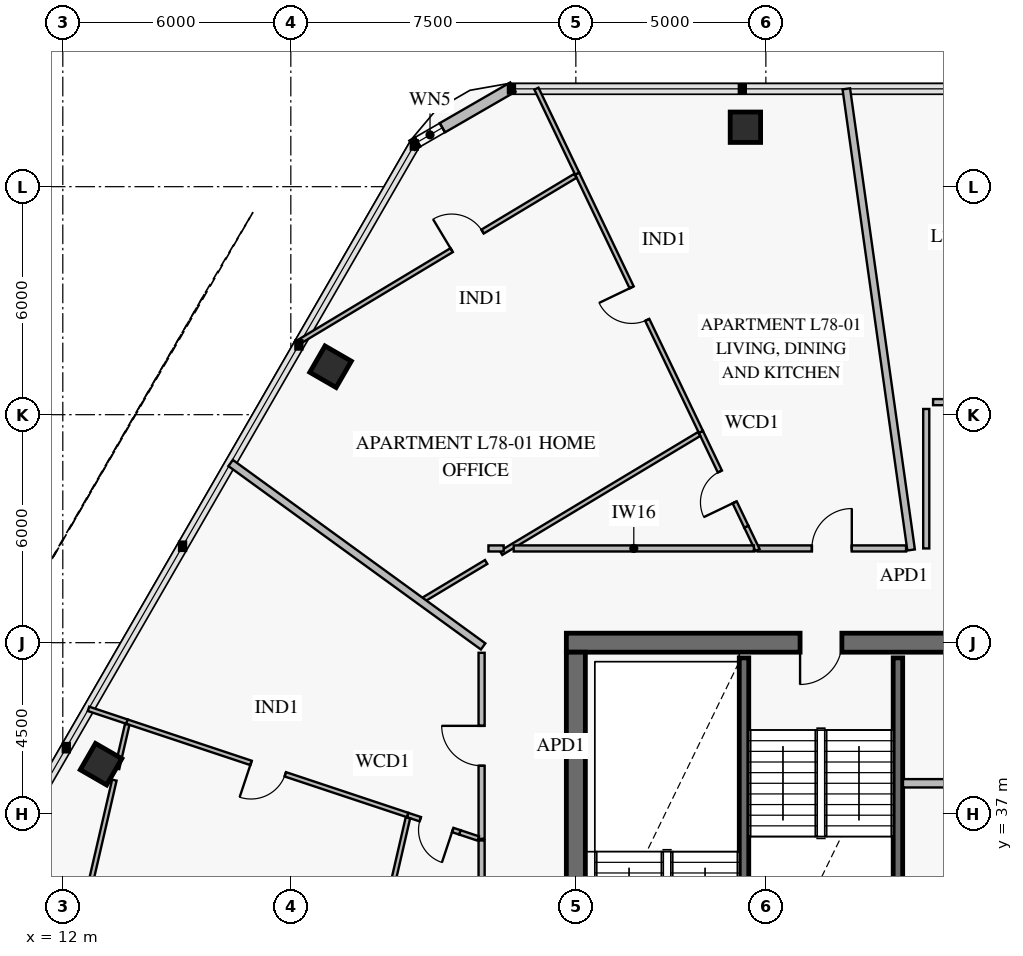
"""IFC4 building model, lengths in metres.
Left out: names, types, materials, properties, quantities, classifications, styles, units other than length and angle.
Written with IfcOpenShell. Run it as: python <this file> out.ifc"""

import sys

from ifc_helpers import new_model, si_unit, direction, frame, frame_2d, origin, origin_2d, place, context, subcontext, project, spatial, rectangle, extrude, element, fill, save


model = new_model("IFC4")
c1 = context("Model", 3, precision=1e-05, world=origin(), true_north=direction((0.0, 1.0)))
c2 = subcontext(c1, "Body", "Model", "MODEL_VIEW")
j1 = project(units=[si_unit("LENGTHUNIT", "METRE"), si_unit("PLANEANGLEUNIT", "RADIAN")], contexts=[c1])
p1 = place(None, origin())
s1 = spatial("IfcSite", under=j1, at=p1, CompositionType="ELEMENT")
p2 = place(p1, origin())
s2 = spatial("IfcBuilding", under=s1, at=p2, CompositionType="ELEMENT")
p3 = place(p2, frame((0.0, 0.0, 308.2)))
s3 = spatial("IfcBuildingStorey", under=s2, at=p3, CompositionType="ELEMENT", Elevation=308.2)
p4 = place(p3, frame((36.75, 41.5, 0.0), z_axis=(0.0, 0.0, 1.0), x_axis=(-1.0, 0.0, 0.0)))
e1 = element("IfcWall", 1, at=p4, inside=s3, PredefinedType="SHEAR", context=c2, shape_type="SweptSolid", body=[
    extrude(rectangle(XDim=11.5, YDim=0.5, at=frame_2d((5.75, 0.0))), origin(), (0.0, 0.0, 1.0), 3.8),
])
p5 = place(p4, frame((4.25, 0.0, 0.0)))
e2 = element("IfcOpeningElement", 2, at=p5, cuts=e1, PredefinedType="OPENING", context=c2, shape_type="SweptSolid", body=[
    extrude(rectangle(XDim=1.1, YDim=2.15, at=frame_2d((0.55, 1.075))), frame((0.0, 0.262, 0.0), z_axis=(0.0, -1.0, 0.0), x_axis=(1.0, 0.0, 0.0)), (0.0, 0.0, 1.0), 0.524),
])
p6 = place(p3, frame((25.5, 22.75, 0.0), z_axis=(0.0, 0.0, 1.0), x_axis=(0.0, 1.0, 0.0)))
e3 = element("IfcWall", 3, at=p6, inside=s3, PredefinedType="SHEAR", context=c2, shape_type="SweptSolid", body=[
    extrude(rectangle(XDim=18.5, YDim=0.5, at=frame_2d((9.25, 0.0))), origin(), (0.0, 0.0, 1.0), 3.8),
])
p7 = place(p6, frame((9.0, 0.0, 0.0)))
e4 = element("IfcOpeningElement", 4, at=p7, cuts=e3, PredefinedType="OPENING", context=c2, shape_type="SweptSolid", body=[
    extrude(rectangle(XDim=1.1, YDim=2.15, at=frame_2d((0.55, 1.075))), frame((0.0, 0.262, 0.0), z_axis=(0.0, -1.0, 0.0), x_axis=(1.0, 0.0, 0.0)), (0.0, 0.0, 1.0), 0.524),
])
for number, where, z_axis, x_axis in (
    (5, (29.961, 55.064, 0.0), (0.0, 0.0, 1.0), (-1.0, 0.0, 0.0)),
    (6, (19.045, 48.762, 0.0), (0.0, 0.0, 1.0), (-0.5, -0.866, 0.0)),
    (7, (13.007, 38.302, 0.0), (0.0, 0.0, 1.0), (-0.5, -0.866, 0.0)),
):
    element("IfcColumn", number, at=place(p3, frame(where, z_axis=z_axis, x_axis=x_axis)), inside=s3, PredefinedType="COLUMN", context=c2, shape_type="SweptSolid", body=[
        extrude(rectangle(XDim=0.8, YDim=0.8, at=origin_2d()), origin(), (0.0, 0.0, 1.0), 3.55),
    ])
p8 = place(p3, frame((21.189, 54.589, 0.0), z_axis=(0.0, 0.0, 1.0), x_axis=(0.866023752521, 0.50000286006, 0.0)))
e8 = element("IfcWall", 8, at=p8, inside=s3, PredefinedType="SOLIDWALL", context=c2, shape_type="SweptSolid", body=[
    extrude(rectangle(XDim=3.065, YDim=0.28, at=frame_2d((1.532, 0.0))), origin(), (0.0, 0.0, 1.0), 3.55),
])
p9 = place(p8, frame((0.173, 0.0, 0.85)))
e9 = element("IfcOpeningElement", 9, at=p9, cuts=e8, PredefinedType="OPENING", context=c2, shape_type="SweptSolid", body=[
    extrude(rectangle(XDim=0.75, YDim=1.5, at=frame_2d((0.375, 0.75))), frame((0.0, 0.152, 0.0), z_axis=(0.0, -1.0, 0.0), x_axis=(1.0, 0.0, 0.0)), (0.0, 0.0, 1.0), 0.304),
])
for number, where, z_axis, x_axis in (
    (10, (29.925, 31.4, 0.0), (0.0, 0.0, 1.0), (0.0, 1.0, 0.0)),
    (11, (33.975, 31.4, 0.0), (0.0, 0.0, 1.0), (0.0, 1.0, 0.0)),
):
    element("IfcWall", number, at=place(p3, frame(where, z_axis=z_axis, x_axis=x_axis)), inside=s3, PredefinedType="SOLIDWALL", context=c2, shape_type="SweptSolid", body=[
        extrude(rectangle(XDim=9.7, YDim=0.25, at=frame_2d((4.85, 0.0))), origin(), (0.0, 0.0, 1.0), 3.8),
    ])
p10 = place(p3, frame((29.987, 44.55, 0.0), z_axis=(0.0, 0.0, 1.0), x_axis=(-0.432094791042, 0.901828194034, 0.0)))
e12 = element("IfcWall", 12, at=p10, inside=s3, PredefinedType="PARTITIONING", context=c2, shape_type="SweptSolid", body=[
    extrude(rectangle(XDim=2.77, YDim=0.12, at=frame_2d((1.385, 0.0))), origin(), (0.0, 0.0, 1.0), 3.55),
])
p11 = place(p10, frame((0.713, 0.0, 0.0)))
e13 = element("IfcOpeningElement", 13, at=p11, cuts=e12, PredefinedType="OPENING", context=c2, shape_type="SweptSolid", body=[
    extrude(rectangle(XDim=0.9, YDim=2.1, at=frame_2d((0.45, 1.05))), frame((0.0, 0.072, 0.0), z_axis=(0.0, -1.0, 0.0), x_axis=(1.0, 0.0, 0.0)), (0.0, 0.0, 1.0), 0.144),
])
p12 = place(p3, frame((28.79, 47.048, 0.0), z_axis=(0.0, 0.0, 1.0), x_axis=(-0.432076809904, 0.901836809153, 0.0)))
e14 = element("IfcWall", 14, at=p12, inside=s3, PredefinedType="PARTITIONING", context=c2, shape_type="SweptSolid", body=[
    extrude(rectangle(XDim=7.535, YDim=0.12, at=frame_2d((3.768, 0.0))), origin(), (0.0, 0.0, 1.0), 2.97),
])
p13 = place(p12, frame((3.267, 0.0, 0.0)))
e15 = element("IfcOpeningElement", 15, at=p13, cuts=e14, PredefinedType="OPENING", context=c2, shape_type="SweptSolid", body=[
    extrude(rectangle(XDim=0.95, YDim=2.1, at=frame_2d((0.475, 1.05))), frame((0.0, 0.072, 0.0), z_axis=(0.0, -1.0, 0.0), x_axis=(1.0, 0.0, 0.0)), (0.0, 0.0, 1.0), 0.144),
])
p14 = place(p3, frame((25.487, 53.785, 0.0), z_axis=(0.0, 0.0, 1.0), x_axis=(-0.857163620168, -0.515044200299, 0.0)))
e16 = element("IfcWall", 16, at=p14, inside=s3, PredefinedType="PARTITIONING", context=c2, shape_type="SweptSolid", body=[
    extrude(rectangle(XDim=8.574, YDim=0.12, at=frame_2d((4.287, 0.0))), origin(), (0.0, 0.0, 1.0), 3.55),
])
p15 = place(p14, frame((2.848, 0.0, 0.0)))
e17 = element("IfcOpeningElement", 17, at=p15, cuts=e16, PredefinedType="OPENING", context=c2, shape_type="SweptSolid", body=[
    extrude(rectangle(XDim=0.95, YDim=2.1, at=frame_2d((0.475, 1.05))), frame((0.0, 0.072, 0.0), z_axis=(0.0, -1.0, 0.0), x_axis=(1.0, 0.0, 0.0)), (0.0, 0.0, 1.0), 0.144),
])
p16 = place(p3, frame((34.189, 43.98, 0.0), z_axis=(0.0, 0.0, 1.0), x_axis=(-1.0, 0.0, 0.0)))
e18 = element("IfcWall", 18, at=p16, inside=s3, PredefinedType="PARTITIONING", context=c2, shape_type="SweptSolid", body=[
    extrude(rectangle(XDim=3.907, YDim=0.16, at=frame_2d((1.954, 0.0))), origin(), (0.0, 0.0, 1.0), 3.0),
])
p17 = place(p16, frame((1.428, 0.0, 0.0)))
e19 = element("IfcOpeningElement", 19, at=p17, cuts=e18, PredefinedType="OPENING", context=c2, shape_type="SweptSolid", body=[
    extrude(rectangle(XDim=1.05, YDim=2.15, at=frame_2d((0.525, 1.075))), frame((0.0, 0.092, 0.0), z_axis=(0.0, -1.0, 0.0), x_axis=(1.0, 0.0, 0.0)), (0.0, 0.0, 1.0), 0.184),
])
p18 = place(p3, frame((22.45, 36.508, 0.0), z_axis=(0.0, 0.0, 1.0), x_axis=(-0.94886823131, 0.315672424532, 0.0)))
e20 = element("IfcWall", 20, at=p18, inside=s3, PredefinedType="PARTITIONING", context=c2, shape_type="SweptSolid", body=[
    extrude(rectangle(XDim=1.451, YDim=0.12, at=frame_2d((0.726, 0.0))), origin(), (0.0, 0.0, 1.0), 3.55),
])
p19 = place(p18, frame((0.2, 0.0, 0.0)))
e21 = element("IfcOpeningElement", 21, at=p19, cuts=e20, PredefinedType="OPENING", context=c2, shape_type="SweptSolid", body=[
    extrude(rectangle(XDim=0.9, YDim=2.1, at=frame_2d((0.45, 1.05))), frame((0.0, 0.072, 0.0), z_axis=(0.0, -1.0, 0.0), x_axis=(1.0, 0.0, 0.0)), (0.0, 0.0, 1.0), 0.144),
])
p20 = place(p3, frame((21.073, 36.966, 0.0), z_axis=(0.0, 0.0, 1.0), x_axis=(-0.948883822728, 0.315625554995, 0.0)))
e22 = element("IfcWall", 22, at=p20, inside=s3, PredefinedType="PARTITIONING", context=c2, shape_type="SweptSolid", body=[
    extrude(rectangle(XDim=7.785, YDim=0.12, at=frame_2d((3.892, 0.0))), origin(), (0.0, 0.0, 1.0), 2.97),
])
p21 = place(p20, frame((3.392, 0.0, 0.0)))
e23 = element("IfcOpeningElement", 23, at=p21, cuts=e22, PredefinedType="OPENING", context=c2, shape_type="SweptSolid", body=[
    extrude(rectangle(XDim=0.95, YDim=2.1, at=frame_2d((0.475, 1.05))), frame((0.0, 0.072, 0.0), z_axis=(0.0, -1.0, 0.0), x_axis=(1.0, 0.0, 0.0)), (0.0, 0.0, 1.0), 0.144),
])
p22 = place(p3, frame((13.356, 37.882, 0.0), z_axis=(0.0, 0.0, 1.0), x_axis=(-0.224948374829, -0.974370683396, 0.0)))
e24 = element("IfcWall", 24, at=p22, inside=s3, PredefinedType="PARTITIONING", context=c2, shape_type="SweptSolid", body=[
    extrude(rectangle(XDim=10.433, YDim=0.12, at=frame_2d((5.217, 0.0))), origin(), (0.0, 0.0, 1.0), 2.97),
])
p23 = place(p22, frame((4.742, 0.0, 0.0)))
e25 = element("IfcOpeningElement", 25, at=p23, cuts=e24, PredefinedType="OPENING", context=c2, shape_type="SweptSolid", body=[
    extrude(rectangle(XDim=0.95, YDim=2.1, at=frame_2d((0.475, 1.05))), frame((0.0, 0.072, 0.0), z_axis=(0.0, -1.0, 0.0), x_axis=(1.0, 0.0, 0.0)), (0.0, 0.0, 1.0), 0.144),
])
p24 = place(p3, frame((23.02, 41.234, 0.0), z_axis=(0.0, 0.0, 1.0), x_axis=(0.0, -1.0, 0.0)))
e26 = element("IfcWall", 26, at=p24, inside=s3, PredefinedType="PARTITIONING", context=c2, shape_type="SweptSolid", body=[
    extrude(rectangle(XDim=4.895, YDim=0.16, at=frame_2d((2.448, 0.0))), origin(), (0.0, 0.0, 1.0), 3.55),
])
p25 = place(p24, frame((1.923, 0.0, 0.0)))
e27 = element("IfcOpeningElement", 27, at=p25, cuts=e26, PredefinedType="OPENING", context=c2, shape_type="SweptSolid", body=[
    extrude(rectangle(XDim=1.05, YDim=2.15, at=frame_2d((0.525, 1.075))), frame((0.0, 0.092, 0.0), z_axis=(0.0, -1.0, 0.0), x_axis=(1.0, 0.0, 0.0)), (0.0, 0.0, 1.0), 0.184),
])
p26 = place(p3, frame((34.108, 37.8, 0.0), z_axis=(0.0, 0.0, 1.0), x_axis=(1.0, 0.0, 0.0)))
e28 = element("IfcWall", 28, at=p26, inside=s3, PredefinedType="PARTITIONING", context=c2, shape_type="SweptSolid", body=[
    extrude(rectangle(XDim=2.084, YDim=0.22, at=frame_2d((1.042, 0.0))), origin(), (0.0, 0.0, 1.0), 3.55),
])
p27 = place(p3, frame((34.322, 43.94, 0.0), z_axis=(0.0, 0.0, 1.0), x_axis=(-0.139169963781, 0.990268509638, 0.0)))
e29 = element("IfcWall", 29, at=p27, inside=s3, PredefinedType="PARTITIONING", context=c2, shape_type="SweptSolid", body=[
    extrude(rectangle(XDim=12.253, YDim=0.2, at=frame_2d((6.127, 0.0))), origin(), (0.0, 0.0, 1.0), 2.97),
])
p28 = place(p3, frame((30.281, 43.938, 0.0), z_axis=(0.0, 0.0, 1.0), x_axis=(-0.432053187678, 0.901848126359, 0.0)))
e30 = element("IfcWall", 30, at=p28, inside=s3, PredefinedType="PARTITIONING", context=c2, shape_type="SweptSolid", body=[
    extrude(rectangle(XDim=0.679, YDim=0.12, at=frame_2d((0.34, 0.0))), origin(), (0.0, 0.0, 1.0), 3.55),
])
p29 = place(p3, frame((25.535, 53.843, 0.0), z_axis=(0.0, 0.0, 1.0), x_axis=(-0.432145203879, 0.901804037896, 0.0)))
e31 = element("IfcWall", 31, at=p29, inside=s3, PredefinedType="PARTITIONING", context=c2, shape_type="SweptSolid", body=[
    extrude(rectangle(XDim=2.479, YDim=0.12, at=frame_2d((1.24, 0.0))), origin(), (0.0, 0.0, 1.0), 3.55),
])
p30 = place(p3, frame((28.742, 46.99, 0.0), z_axis=(0.0, 0.0, 1.0), x_axis=(-0.85717020717, -0.515033237704, 0.0)))
e32 = element("IfcWall", 32, at=p30, inside=s3, PredefinedType="PARTITIONING", context=c2, shape_type="SweptSolid", body=[
    extrude(rectangle(XDim=6.078, YDim=0.12, at=frame_2d((3.039, 0.0))), origin(), (0.0, 0.0, 1.0), 3.0),
])
p31 = place(p3, frame((23.14, 43.624, 0.0), z_axis=(0.0, 0.0, 1.0), x_axis=(-0.857182204265, -0.515013270403, 0.0)))
e33 = element("IfcWall", 33, at=p31, inside=s3, PredefinedType="PARTITIONING", context=c2, shape_type="SweptSolid", body=[
    extrude(rectangle(XDim=1.942, YDim=0.12, at=frame_2d((0.971, 0.0))), origin(), (0.0, 0.0, 1.0), 3.55),
])
p32 = place(p3, frame((23.06, 41.402, 0.0), z_axis=(0.0, 0.0, 1.0), x_axis=(-0.80902654106, 0.587772112184, 0.0)))
e34 = element("IfcWall", 34, at=p32, inside=s3, PredefinedType="PARTITIONING", context=c2, shape_type="SweptSolid", body=[
    extrude(rectangle(XDim=8.212, YDim=0.2, at=frame_2d((4.106, 0.0))), origin(), (0.0, 0.0, 1.0), 2.97),
])
p33 = place(p3, frame((22.932, 36.347, 0.0), z_axis=(0.0, 0.0, 1.0), x_axis=(-0.948827398112, 0.315795137062, 0.0)))
e35 = element("IfcWall", 35, at=p33, inside=s3, PredefinedType="PARTITIONING", context=c2, shape_type="SweptSolid", body=[
    extrude(rectangle(XDim=0.508, YDim=0.12, at=frame_2d((0.254, 0.0))), origin(), (0.0, 0.0, 1.0), 3.55),
])
p34 = place(p3, frame((13.687, 39.423, 0.0), z_axis=(0.0, 0.0, 1.0), x_axis=(-0.948843569766, 0.315746544105, 0.0)))
e36 = element("IfcWall", 36, at=p34, inside=s3, PredefinedType="PARTITIONING", context=c2, shape_type="SweptSolid", body=[
    extrude(rectangle(XDim=1.065, YDim=0.12, at=frame_2d((0.533, 0.0))), origin(), (0.0, 0.0, 1.0), 2.97),
])
p35 = place(p3, frame((21.082, 36.891, 0.0), z_axis=(0.0, 0.0, 1.0), x_axis=(-0.224929350613, -0.974375075232, 0.0)))
e37 = element("IfcWall", 37, at=p35, inside=s3, PredefinedType="PARTITIONING", context=c2, shape_type="SweptSolid", body=[
    extrude(rectangle(XDim=3.829, YDim=0.12, at=frame_2d((1.915, 0.0))), origin(), (0.0, 0.0, 1.0), 3.0),
])
p36 = place(p3, frame((13.695, 39.348, 0.0), z_axis=(0.0, 0.0, 1.0), x_axis=(-0.225009033114, -0.974356677515, 0.0)))
e38 = element("IfcWall", 38, at=p36, inside=s3, PredefinedType="PARTITIONING", context=c2, shape_type="SweptSolid", body=[
    extrude(rectangle(XDim=1.192, YDim=0.12, at=frame_2d((0.596, 0.0))), origin(), (0.0, 0.0, 1.0), 2.97),
])
p37 = place(p3, frame((30.185, 43.98, 0.0), z_axis=(0.0, 0.0, 1.0), x_axis=(-1.0, 0.0, 0.0)))
e39 = element("IfcWall", 39, at=p37, inside=s3, PredefinedType="PARTITIONING", context=c2, shape_type="SweptSolid", body=[
    extrude(rectangle(XDim=6.32, YDim=0.16, at=frame_2d((3.16, 0.0))), origin(), (0.0, 0.0, 1.0), 3.0),
])
p38 = place(p3, frame((23.601, 43.98, 0.0), z_axis=(0.0, 0.0, 1.0), x_axis=(-1.0, 0.0, 0.0)))
e40 = element("IfcWall", 40, at=p38, inside=s3, PredefinedType="PARTITIONING", context=c2, shape_type="SweptSolid", body=[
    extrude(rectangle(XDim=0.401, YDim=0.16, at=frame_2d((0.2, 0.0))), origin(), (0.0, 0.0, 1.0), 3.55),
])
p39 = place(p3, frame((23.02, 36.297, 0.0), z_axis=(0.0, 0.0, 1.0), x_axis=(0.0, -1.0, 0.0)))
e41 = element("IfcWall", 41, at=p39, inside=s3, PredefinedType="PARTITIONING", context=c2, shape_type="SweptSolid", body=[
    extrude(rectangle(XDim=3.017, YDim=0.16, at=frame_2d((1.508, 0.0))), origin(), (0.0, 0.0, 1.0), 3.0),
])
p40 = place(p3, frame((34.72, 47.65, 0.0), z_axis=(0.0, 0.0, 1.0), x_axis=(0.0, -1.0, 0.0)))
e42 = element("IfcWall", 42, at=p40, inside=s3, PredefinedType="PARTITIONING", context=c2, shape_type="SweptSolid", body=[
    extrude(rectangle(XDim=3.67, YDim=0.16, at=frame_2d((1.835, 0.0))), origin(), (0.0, 0.0, 1.0), 3.55),
])
p41 = place(p3, frame((37.1, 47.83, 0.0), z_axis=(0.0, 0.0, 1.0), x_axis=(-1.0, 0.0, 0.0)))
e43 = element("IfcWall", 43, at=p41, inside=s3, PredefinedType="PARTITIONING", context=c2, shape_type="SweptSolid", body=[
    extrude(rectangle(XDim=2.2, YDim=0.16, at=frame_2d((1.1, 0.0))), origin(), (0.0, 0.0, 1.0), 3.55),
])
p42 = place(p9, origin())
e44 = element("IfcWindow", 44, at=p42, inside=s3, PartitioningType="SINGLE_PANEL", PredefinedType="WINDOW", context=c2, shape_type="SweptSolid", body=[
    extrude(rectangle(XDim=0.75, YDim=1.5, at=frame_2d((0.375, 0.75))), frame((0.0, 0.03, 0.0), z_axis=(0.0, -1.0, 0.0), x_axis=(1.0, 0.0, 0.0)), (0.0, 0.0, 1.0), 0.06),
])
fill(e9, e44)
p43 = place(p5, origin())
e45 = element("IfcDoor", 45, at=p43, inside=s3, OperationType="SINGLE_SWING_RIGHT", PredefinedType="USERDEFINED", context=c2, shape_type="SweptSolid", body=[
    extrude(rectangle(XDim=1.1, YDim=2.15, at=frame_2d((0.55, 1.075))), frame((0.0, 0.025, 0.0), z_axis=(0.0, -1.0, 0.0), x_axis=(1.0, 0.0, 0.0)), (0.0, 0.0, 1.0), 0.05),
])
fill(e2, e45)
p44 = place(p11, origin())
e46 = element("IfcDoor", 46, at=p44, inside=s3, OperationType="SINGLE_SWING_LEFT", PredefinedType="DOOR", context=c2, shape_type="SweptSolid", body=[
    extrude(rectangle(XDim=0.9, YDim=2.1, at=frame_2d((0.45, 1.05))), frame((0.0, 0.025, 0.0), z_axis=(0.0, -1.0, 0.0), x_axis=(1.0, 0.0, 0.0)), (0.0, 0.0, 1.0), 0.05),
])
fill(e13, e46)
p45 = place(p13, origin())
e47 = element("IfcDoor", 47, at=p45, inside=s3, OperationType="SINGLE_SWING_RIGHT", PredefinedType="DOOR", context=c2, shape_type="SweptSolid", body=[
    extrude(rectangle(XDim=0.95, YDim=2.1, at=frame_2d((0.475, 1.05))), frame((0.0, 0.025, 0.0), z_axis=(0.0, -1.0, 0.0), x_axis=(1.0, 0.0, 0.0)), (0.0, 0.0, 1.0), 0.05),
])
fill(e15, e47)
p46 = place(p15, frame((0.95, 0.0, 0.0), z_axis=(0.0, 0.0, 1.0), x_axis=(-1.0, 0.0, 0.0)))
e48 = element("IfcDoor", 48, at=p46, inside=s3, OperationType="SINGLE_SWING_LEFT", PredefinedType="DOOR", context=c2, shape_type="SweptSolid", body=[
    extrude(rectangle(XDim=0.95, YDim=2.1, at=frame_2d((0.475, 1.05))), frame((0.0, 0.025, 0.0), z_axis=(0.0, -1.0, 0.0), x_axis=(1.0, 0.0, 0.0)), (0.0, 0.0, 1.0), 0.05),
])
fill(e17, e48)
p47 = place(p17, frame((1.05, 0.0, 0.0), z_axis=(0.0, 0.0, 1.0), x_axis=(-1.0, 0.0, 0.0)))
e49 = element("IfcDoor", 49, at=p47, inside=s3, OperationType="SINGLE_SWING_RIGHT", PredefinedType="DOOR", context=c2, shape_type="SweptSolid", body=[
    extrude(rectangle(XDim=1.05, YDim=2.15, at=frame_2d((0.525, 1.075))), frame((0.0, 0.025, 0.0), z_axis=(0.0, -1.0, 0.0), x_axis=(1.0, 0.0, 0.0)), (0.0, 0.0, 1.0), 0.05),
])
fill(e19, e49)
p48 = place(p19, origin())
e50 = element("IfcDoor", 50, at=p48, inside=s3, OperationType="SINGLE_SWING_LEFT", PredefinedType="DOOR", context=c2, shape_type="SweptSolid", body=[
    extrude(rectangle(XDim=0.9, YDim=2.1, at=frame_2d((0.45, 1.05))), frame((0.0, 0.025, 0.0), z_axis=(0.0, -1.0, 0.0), x_axis=(1.0, 0.0, 0.0)), (0.0, 0.0, 1.0), 0.05),
])
fill(e21, e50)
p49 = place(p21, origin())
e51 = element("IfcDoor", 51, at=p49, inside=s3, OperationType="SINGLE_SWING_RIGHT", PredefinedType="DOOR", context=c2, shape_type="SweptSolid", body=[
    extrude(rectangle(XDim=0.95, YDim=2.1, at=frame_2d((0.475, 1.05))), frame((0.0, 0.025, 0.0), z_axis=(0.0, -1.0, 0.0), x_axis=(1.0, 0.0, 0.0)), (0.0, 0.0, 1.0), 0.05),
])
fill(e23, e51)
p50 = place(p25, frame((1.05, 0.0, 0.0), z_axis=(0.0, 0.0, 1.0), x_axis=(-1.0, 0.0, 0.0)))
e52 = element("IfcDoor", 52, at=p50, inside=s3, OperationType="SINGLE_SWING_RIGHT", PredefinedType="DOOR", context=c2, shape_type="SweptSolid", body=[
    extrude(rectangle(XDim=1.05, YDim=2.15, at=frame_2d((0.525, 1.075))), frame((0.0, 0.025, 0.0), z_axis=(0.0, -1.0, 0.0), x_axis=(1.0, 0.0, 0.0)), (0.0, 0.0, 1.0), 0.05),
])
fill(e27, e52)
save(model, sys.argv[1])
